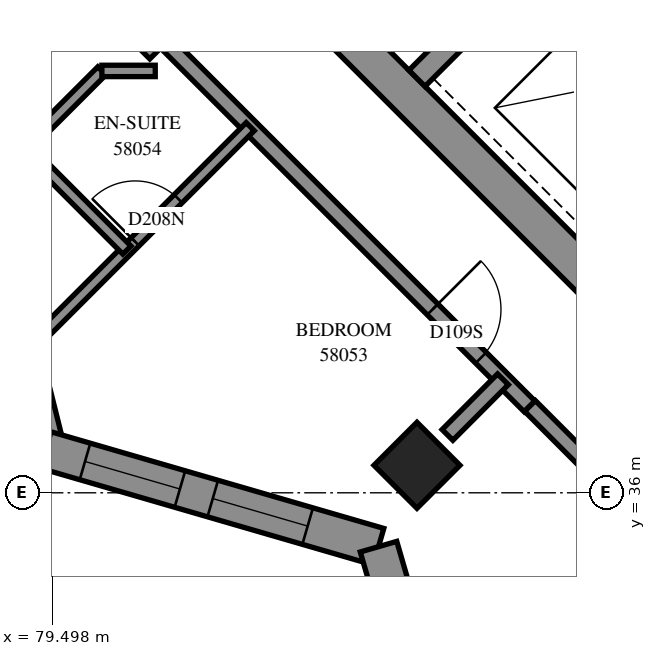
"""IFC4 building model, lengths in metres.
Left out: names, types, materials, properties, quantities, classifications, styles, units other than length and angle.
Written with IfcOpenShell. Run it as: python <this file> out.ifc"""

import sys

from ifc_helpers import new_model, si_unit, direction, frame, frame_2d, origin, origin_2d, place, context, subcontext, project, spatial, polyline, rectangle, outline, extrude, element, fill, save


model = new_model("IFC4")
c1 = context("Model", 3, precision=1e-05, world=origin(), true_north=direction((0.0, 1.0)))
c2 = subcontext(c1, "Body", "Model", "MODEL_VIEW")
j1 = project(units=[si_unit("LENGTHUNIT", "METRE"), si_unit("PLANEANGLEUNIT", "RADIAN")], contexts=[c1])
p1 = place(None, origin())
s1 = spatial("IfcSite", under=j1, at=p1, CompositionType="ELEMENT")
p2 = place(p1, origin())
s2 = spatial("IfcBuilding", under=s1, at=p2, CompositionType="ELEMENT")
p3 = place(p2, frame((0.0, 0.0, 213.4)))
s3 = spatial("IfcBuildingStorey", under=s2, at=p3, CompositionType="ELEMENT", Elevation=213.4)
p4 = place(p3, frame((84.291, 36.362, 0.0), z_axis=(0.0, 0.0, 1.0), x_axis=(0.7071067812, -0.7071067812, 0.0)))
e1 = element("IfcColumn", 1, at=p4, inside=s3, PredefinedType="COLUMN", context=c2, shape_type="SweptSolid", body=[
    extrude(rectangle(XDim=0.8, YDim=0.8, at=origin_2d()), origin(), (0.0, 0.0, 1.0), 3.1),
])
p5 = place(p3, frame((76.124, 49.267, -0.3), z_axis=(0.0, 0.0, 1.0), x_axis=(0.7071067812, -0.7071067812, 0.0)))
e2 = element("IfcWall", 2, at=p5, inside=s3, PredefinedType="SHEAR", context=c2, shape_type="SweptSolid", body=[
    extrude(rectangle(XDim=15.4, YDim=0.5, at=frame_2d((7.7, 0.0))), origin(), (0.0, 0.0, 1.0), 2.7),
])
p6 = place(p3, frame((84.291, 41.453, 0.0), z_axis=(0.0, 0.0, 1.0), x_axis=(0.7071067812, 0.7071067812, 0.0)))
e3 = element("IfcWall", 3, at=p6, inside=s3, PredefinedType="SOLIDWALL", context=c2, shape_type="SweptSolid", body=[
    extrude(rectangle(XDim=3.3, YDim=0.3, at=frame_2d((1.65, 0.0))), origin(), (0.0, 0.0, 1.0), 3.1),
])
p7 = place(p3, frame((78.988, 51.423, 0.0), z_axis=(0.0, 0.0, 1.0), x_axis=(0.7071067812, -0.7071067812, 0.0)))
e4 = element("IfcWall", 4, at=p7, inside=s3, PredefinedType="SOLIDWALL", context=c2, shape_type="SweptSolid", body=[
    extrude(rectangle(XDim=14.4, YDim=0.3, at=frame_2d((7.2, 0.0))), origin(), (0.0, 0.0, 1.0), 3.1),
])
p8 = place(p7, frame((1.35, 0.0, 0.0)))
e5 = element("IfcOpeningElement", 5, at=p8, cuts=e4, PredefinedType="OPENING", context=c2, shape_type="SweptSolid", body=[
    extrude(rectangle(XDim=0.9, YDim=2.1, at=frame_2d((0.45, 1.05))), frame((0.0, 0.16, 0.0), z_axis=(0.0, -1.0, 0.0), x_axis=(1.0, 0.0, 0.0)), (0.0, 0.0, 1.0), 0.32),
])
p9 = place(p7, frame((4.95, 0.0, 0.0)))
e6 = element("IfcOpeningElement", 6, at=p9, cuts=e4, PredefinedType="OPENING", context=c2, shape_type="SweptSolid", body=[
    extrude(rectangle(XDim=0.9, YDim=2.1, at=frame_2d((0.45, 1.05))), frame((0.0, 0.16, 0.0), z_axis=(0.0, -1.0, 0.0), x_axis=(1.0, 0.0, 0.0)), (0.0, 0.0, 1.0), 0.32),
])
p10 = place(p7, frame((8.55, 0.0, 0.0)))
e7 = element("IfcOpeningElement", 7, at=p10, cuts=e4, PredefinedType="OPENING", context=c2, shape_type="SweptSolid", body=[
    extrude(rectangle(XDim=0.9, YDim=2.1, at=frame_2d((0.45, 1.05))), frame((0.0, 0.16, 0.0), z_axis=(0.0, -1.0, 0.0), x_axis=(1.0, 0.0, 0.0)), (0.0, 0.0, 1.0), 0.32),
])
p11 = place(p7, frame((12.05, 0.0, 0.0)))
e8 = element("IfcOpeningElement", 8, at=p11, cuts=e4, PredefinedType="OPENING", context=c2, shape_type="SweptSolid", body=[
    extrude(rectangle(XDim=1.1, YDim=2.1, at=frame_2d((0.55, 1.05))), frame((0.0, 0.16, 0.0), z_axis=(0.0, -1.0, 0.0), x_axis=(1.0, 0.0, 0.0)), (0.0, 0.0, 1.0), 0.32),
])
p12 = place(p3, frame((78.276, 41.085, 0.0), z_axis=(0.0, 0.0, 1.0), x_axis=(0.2425659058, -0.9701349295, 0.0)))
e9 = element("IfcWall", 9, at=p12, inside=s3, PredefinedType="SOLIDWALL", context=c2, shape_type="SweptSolid", body=[
    extrude(outline(polyline([(0.141, -0.25), (4.806, -0.25), (4.519, 0.25), (-0.141, 0.25), (0.141, -0.25)])), origin(), (0.0, 0.0, 1.0), 3.1),
])
p13 = place(p12, frame((1.875, 0.0, 0.45)))
e10 = element("IfcOpeningElement", 10, at=p13, cuts=e9, PredefinedType="OPENING", context=c2, shape_type="SweptSolid", body=[
    extrude(rectangle(XDim=1.2, YDim=2.5, at=frame_2d((0.6, 1.25))), frame((0.0, 0.26, 0.0), z_axis=(0.0, -1.0, 0.0), x_axis=(1.0, 0.0, 0.0)), (0.0, 0.0, 1.0), 0.52),
])
p14 = place(p3, frame((79.407, 36.562, 0.0), z_axis=(0.0, 0.0, 1.0), x_axis=(0.9603356169, -0.2788467373, 0.0)))
e11 = element("IfcWall", 11, at=p14, inside=s3, PredefinedType="SOLIDWALL", context=c2, shape_type="SweptSolid", body=[
    extrude(outline(polyline([(-0.144, -0.25), (4.422, -0.25), (4.697, 0.25), (0.144, 0.25), (-0.144, -0.25)])), origin(), (0.0, 0.0, 1.0), 3.1),
])
p15 = place(p14, frame((0.538, 0.0, 0.45)))
e12 = element("IfcOpeningElement", 12, at=p15, cuts=e11, PredefinedType="OPENING", context=c2, shape_type="SweptSolid", body=[
    extrude(rectangle(XDim=1.3, YDim=2.5, at=frame_2d((0.65, 1.25))), frame((0.0, 0.26, 0.0), z_axis=(0.0, -1.0, 0.0), x_axis=(1.0, 0.0, 0.0)), (0.0, 0.0, 1.0), 0.52),
])
p16 = place(p14, frame((2.288, 0.0, 0.45)))
e13 = element("IfcOpeningElement", 13, at=p16, cuts=e11, PredefinedType="OPENING", context=c2, shape_type="SweptSolid", body=[
    extrude(rectangle(XDim=1.3, YDim=2.5, at=frame_2d((0.65, 1.25))), frame((0.0, 0.26, 0.0), z_axis=(0.0, -1.0, 0.0), x_axis=(1.0, 0.0, 0.0)), (0.0, 0.0, 1.0), 0.52),
])
p17 = place(p3, frame((83.785, 35.291, 0.0), z_axis=(0.0, 0.0, 1.0), x_axis=(0.2788467373, -0.9603356169, 0.0)))
e14 = element("IfcWall", 14, at=p17, inside=s3, PredefinedType="SOLIDWALL", context=c2, shape_type="SweptSolid", body=[
    extrude(outline(polyline([(0.138, -0.25), (4.703, -0.25), (4.415, 0.25), (-0.138, 0.25), (0.138, -0.25)])), origin(), (0.0, 0.0, 1.0), 3.1),
])
p18 = place(p17, frame((1.005, 0.0, 0.45)))
e15 = element("IfcOpeningElement", 15, at=p18, cuts=e14, PredefinedType="OPENING", context=c2, shape_type="SweptSolid", body=[
    extrude(rectangle(XDim=1.2, YDim=2.5, at=frame_2d((0.6, 1.25))), frame((0.0, 0.26, 0.0), z_axis=(0.0, -1.0, 0.0), x_axis=(1.0, 0.0, 0.0)), (0.0, 0.0, 1.0), 0.52),
])
p19 = place(p3, frame((85.007, 31.981, 0.0), z_axis=(0.0, 0.0, 1.0), x_axis=(0.7072318784, 0.7069816619, 0.0)))
e16 = element("IfcWall", 16, at=p19, inside=s3, PredefinedType="PARTITIONING", context=c2, shape_type="SweptSolid", body=[
    extrude(rectangle(XDim=9.991, YDim=0.2, at=frame_2d((4.996, 0.0))), origin(), (0.0, 0.0, 1.0), 3.1),
])
p20 = place(p3, frame((80.849, 42.061, 0.0), z_axis=(0.0, 0.0, 1.0), x_axis=(0.7071067812, -0.7071067812, 0.0)))
e17 = element("IfcWall", 17, at=p20, inside=s3, PredefinedType="PARTITIONING", context=c2, shape_type="SweptSolid", body=[
    extrude(rectangle(XDim=6.964, YDim=0.2, at=frame_2d((3.482, 0.0))), origin(), (0.0, 0.0, 1.0), 3.1),
])
p21 = place(p20, frame((5.159, 0.0, 0.0)))
e18 = element("IfcOpeningElement", 18, at=p21, cuts=e17, PredefinedType="OPENING", context=c2, shape_type="SweptSolid", body=[
    extrude(rectangle(XDim=0.9, YDim=2.1, at=frame_2d((0.45, 1.05))), frame((0.0, 0.11, 0.0), z_axis=(0.0, -1.0, 0.0), x_axis=(1.0, 0.0, 0.0)), (0.0, 0.0, 1.0), 0.22),
])
p22 = place(p3, frame((79.3, 38.02, 0.0), z_axis=(0.0, 0.0, 1.0), x_axis=(0.7070941404, 0.7071194217, 0.0)))
e19 = element("IfcWall", 19, at=p22, inside=s3, PredefinedType="PARTITIONING", context=c2, shape_type="SweptSolid", body=[
    extrude(rectangle(XDim=3.955, YDim=0.15, at=frame_2d((1.978, 0.0))), origin(), (0.0, 0.0, 1.0), 3.1),
])
p23 = place(p22, frame((1.815, 0.0, 0.0)))
e20 = element("IfcOpeningElement", 20, at=p23, cuts=e19, PredefinedType="OPENING", context=c2, shape_type="SweptSolid", body=[
    extrude(rectangle(XDim=0.8, YDim=2.1, at=frame_2d((0.4, 1.05))), frame((0.0, 0.085, 0.0), z_axis=(0.0, -1.0, 0.0), x_axis=(1.0, 0.0, 0.0)), (0.0, 0.0, 1.0), 0.17),
])
p24 = place(p3, frame((78.349, 41.322, 0.0), z_axis=(0.0, 0.0, 1.0), x_axis=(0.7065914398, -0.7076217472, 0.0)))
e21 = element("IfcWall", 21, at=p24, inside=s3, PredefinedType="PARTITIONING", context=c2, shape_type="SweptSolid", body=[
    extrude(rectangle(XDim=3.009, YDim=0.15, at=frame_2d((1.504, 0.0))), origin(), (0.0, 0.0, 1.0), 3.1),
])
p25 = place(p3, frame((78.763, 40.169, 0.0), z_axis=(0.0, 0.0, 1.0), x_axis=(0.7070811971, 0.7071323644, 0.0)))
e22 = element("IfcWall", 22, at=p25, inside=s3, PredefinedType="PARTITIONING", context=c2, shape_type="SweptSolid", body=[
    extrude(rectangle(XDim=1.954, YDim=0.15, at=frame_2d((0.977, 0.0))), origin(), (0.0, 0.0, 1.0), 3.1),
])
p26 = place(p3, frame((85.778, 37.142, 0.0), z_axis=(0.0, 0.0, 1.0), x_axis=(0.7064400143, -0.70777292, 0.0)))
e23 = element("IfcWall", 23, at=p26, inside=s3, PredefinedType="PARTITIONING", context=c2, shape_type="SweptSolid", body=[
    extrude(rectangle(XDim=1.5, YDim=0.2, at=frame_2d((0.75, 0.0))), origin(), (0.0, 0.0, 1.0), 3.1),
])
p27 = place(p3, frame((84.693, 36.761, 0.0), z_axis=(0.0, 0.0, 1.0), x_axis=(0.7061388061, 0.708073433, 0.0)))
e24 = element("IfcWall", 24, at=p27, inside=s3, PredefinedType="PARTITIONING", context=c2, shape_type="SweptSolid", body=[
    extrude(rectangle(XDim=1.034, YDim=0.2, at=frame_2d((0.517, 0.0))), origin(), (0.0, 0.0, 1.0), 3.1),
])
p28 = place(p3, frame((80.146, 41.55, 0.0), z_axis=(0.0, 0.0, 1.0), x_axis=(1.0, 0.0, 0.0)))
e25 = element("IfcWall", 25, at=p28, inside=s3, PredefinedType="PARTITIONING", context=c2, shape_type="SweptSolid", body=[
    extrude(rectangle(XDim=0.702, YDim=0.15, at=frame_2d((0.351, 0.0))), origin(), (0.0, 0.0, 1.0), 3.1),
])
p29 = place(p3, frame((80.497, 42.129, 0.0), z_axis=(0.0, 0.0, 1.0), x_axis=(0.7071067812, -0.7071067812, 0.0)))
e26 = element("IfcWall", 26, at=p29, inside=s3, PredefinedType="PARTITIONING", context=c2, shape_type="SweptSolid", body=[
    extrude(rectangle(XDim=0.495, YDim=0.2, at=frame_2d((0.247, 0.0))), origin(), (0.0, 0.0, 1.0), 3.1),
])
p30 = place(p15, origin())
e27 = element("IfcWindow", 27, at=p30, inside=s3, PartitioningType="SINGLE_PANEL", PredefinedType="WINDOW", context=c2, shape_type="SweptSolid", body=[
    extrude(rectangle(XDim=1.3, YDim=2.5, at=frame_2d((0.65, 1.25))), frame((0.0, 0.18, 0.0), z_axis=(0.0, -1.0, 0.0), x_axis=(1.0, 0.0, 0.0)), (0.0, 0.0, 1.0), 0.06),
])
fill(e12, e27)
p31 = place(p16, origin())
e28 = element("IfcWindow", 28, at=p31, inside=s3, PartitioningType="SINGLE_PANEL", PredefinedType="WINDOW", context=c2, shape_type="SweptSolid", body=[
    extrude(rectangle(XDim=1.3, YDim=2.5, at=frame_2d((0.65, 1.25))), frame((0.0, 0.18, 0.0), z_axis=(0.0, -1.0, 0.0), x_axis=(1.0, 0.0, 0.0)), (0.0, 0.0, 1.0), 0.06),
])
fill(e13, e28)
p32 = place(p21, origin())
e29 = element("IfcDoor", 29, at=p32, inside=s3, OperationType="SINGLE_SWING_RIGHT", PredefinedType="DOOR", context=c2, shape_type="SweptSolid", body=[
    extrude(rectangle(XDim=0.9, YDim=2.1, at=frame_2d((0.45, 1.05))), frame((0.0, 0.025, 0.0), z_axis=(0.0, -1.0, 0.0), x_axis=(1.0, 0.0, 0.0)), (0.0, 0.0, 1.0), 0.05),
])
fill(e18, e29)
p33 = place(p23, origin())
e30 = element("IfcDoor", 30, at=p33, inside=s3, OperationType="SINGLE_SWING_RIGHT", PredefinedType="DOOR", context=c2, shape_type="SweptSolid", body=[
    extrude(rectangle(XDim=0.8, YDim=2.1, at=frame_2d((0.4, 1.05))), frame((0.0, 0.025, 0.0), z_axis=(0.0, -1.0, 0.0), x_axis=(1.0, 0.0, 0.0)), (0.0, 0.0, 1.0), 0.05),
])
fill(e20, e30)
save(model, sys.argv[1])
